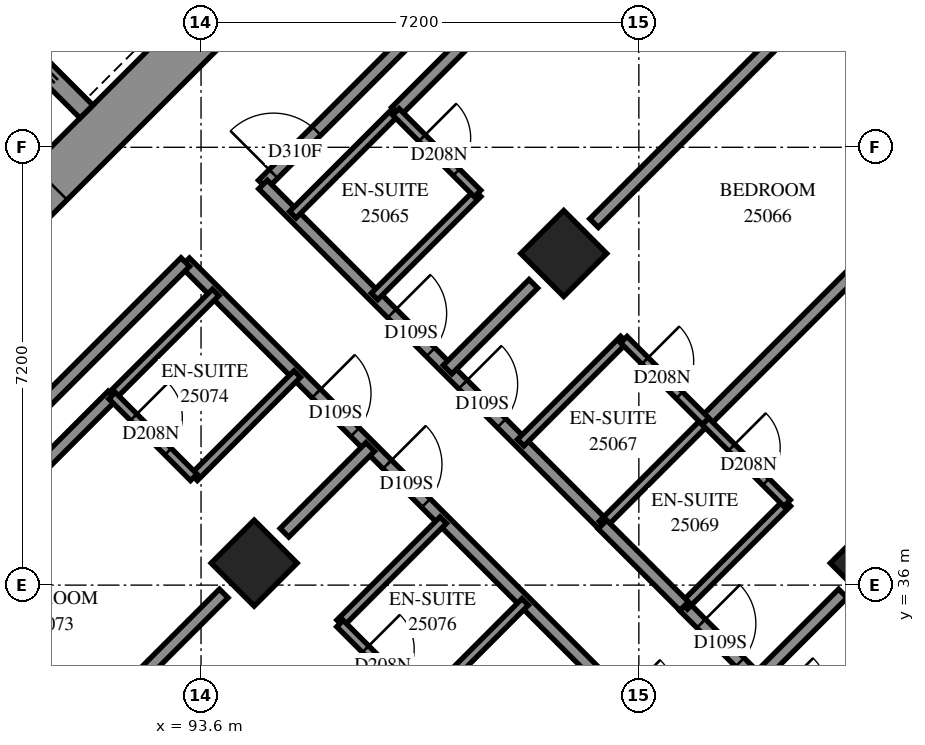
"""IFC4 building model, lengths in metres.
Left out: names, types, materials, properties, quantities, classifications, styles, units other than length and angle.
Written with IfcOpenShell. Run it as: python <this file> out.ifc"""

import sys

from ifc_helpers import new_model, si_unit, direction, frame, frame_2d, origin, origin_2d, place, context, subcontext, project, spatial, rectangle, extrude, element, fill, save


model = new_model("IFC4")
c1 = context("Model", 3, precision=1e-05, world=origin(), true_north=direction((0.0, 1.0)))
c2 = subcontext(c1, "Body", "Model", "MODEL_VIEW")
j1 = project(units=[si_unit("LENGTHUNIT", "METRE"), si_unit("PLANEANGLEUNIT", "RADIAN")], contexts=[c1])
p1 = place(None, origin())
s1 = spatial("IfcSite", under=j1, at=p1, CompositionType="ELEMENT")
p2 = place(p1, origin())
s2 = spatial("IfcBuilding", under=s1, at=p2, CompositionType="ELEMENT")
p3 = place(p2, frame((0.0, 0.0, 94.8)))
s3 = spatial("IfcBuildingStorey", under=s2, at=p3, CompositionType="ELEMENT", Elevation=94.8)
for number, where, z_axis, x_axis in (
    (1, (99.565, 41.453, 0.0), (0.0, 0.0, 1.0), (0.707, -0.707, 0.0)),
    (2, (94.474, 36.362, 0.0), (0.0, 0.0, 1.0), (0.707, -0.707, 0.0)),
    (3, (104.656, 36.362, 0.0), (0.0, 0.0, 1.0), (0.707, -0.707, 0.0)),
):
    element("IfcColumn", number, at=place(p3, frame(where, z_axis=z_axis, x_axis=x_axis)), inside=s3, PredefinedType="COLUMN", context=c2, shape_type="SweptSolid", body=[
        extrude(rectangle(XDim=1.0, YDim=1.0, at=origin_2d()), origin(), (0.0, 0.0, 1.0), 3.1),
    ])
p4 = place(p3, frame((87.12, 38.625, -0.3), z_axis=(0.0, 0.0, 1.0), x_axis=(0.7071067812, 0.7071067812, 0.0)))
e4 = element("IfcWall", 4, at=p4, inside=s3, PredefinedType="SHEAR", context=c2, shape_type="SweptSolid", body=[
    extrude(rectangle(XDim=14.4, YDim=0.8, at=frame_2d((7.2, 0.0))), origin(), (0.0, 0.0, 1.0), 2.7),
])
p5 = place(p4, frame((4.55, 0.0, 0.3)))
e5 = element("IfcOpeningElement", 5, at=p5, cuts=e4, PredefinedType="OPENING", context=c2, shape_type="SweptSolid", body=[
    extrude(rectangle(XDim=1.1, YDim=2.1, at=frame_2d((0.55, 1.05))), frame((0.0, 0.41, 0.0), z_axis=(0.0, -1.0, 0.0), x_axis=(1.0, 0.0, 0.0)), (0.0, 0.0, 1.0), 0.82),
])
p6 = place(p4, frame((11.35, 0.0, 0.3)))
e6 = element("IfcOpeningElement", 6, at=p6, cuts=e4, PredefinedType="OPENING", context=c2, shape_type="SweptSolid", body=[
    extrude(rectangle(XDim=1.1, YDim=2.1, at=frame_2d((0.55, 1.05))), frame((0.0, 0.41, 0.0), z_axis=(0.0, -1.0, 0.0), x_axis=(1.0, 0.0, 0.0)), (0.0, 0.0, 1.0), 0.82),
])
p7 = place(p3, frame((81.534, 53.969, 0.0), z_axis=(0.0, 0.0, 1.0), x_axis=(0.707103309, -0.7071102534, 0.0)))
e7 = element("IfcWall", 7, at=p7, inside=s3, PredefinedType="SOLIDWALL", context=c2, shape_type="SweptSolid", body=[
    extrude(rectangle(XDim=14.4, YDim=0.3, at=frame_2d((7.2, 0.0))), origin(), (0.0, 0.0, 1.0), 3.1),
])
p8 = place(p7, frame((12.05, 0.0, 0.0)))
e8 = element("IfcOpeningElement", 8, at=p8, cuts=e7, PredefinedType="OPENING", context=c2, shape_type="SweptSolid", body=[
    extrude(rectangle(XDim=1.1, YDim=2.1, at=frame_2d((0.55, 1.05))), frame((0.0, 0.16, 0.0), z_axis=(0.0, -1.0, 0.0), x_axis=(1.0, 0.0, 0.0)), (0.0, 0.0, 1.0), 0.32),
])
p9 = place(p3, frame((93.339, 41.309, 0.0), z_axis=(0.0, 0.0, 1.0), x_axis=(0.7071067812, -0.7071067812, 0.0)))
e9 = element("IfcWall", 9, at=p9, inside=s3, PredefinedType="PARTITIONING", context=c2, shape_type="SweptSolid", body=[
    extrude(rectangle(XDim=18.702, YDim=0.2, at=frame_2d((9.351, 0.0))), origin(), (0.0, 0.0, 1.0), 3.1),
])
p10 = place(p9, frame((3.05, 0.0, 0.0)))
e10 = element("IfcOpeningElement", 10, at=p10, cuts=e9, PredefinedType="OPENING", context=c2, shape_type="SweptSolid", body=[
    extrude(rectangle(XDim=0.9, YDim=2.1, at=frame_2d((0.45, 1.05))), frame((0.0, 0.11, 0.0), z_axis=(0.0, -1.0, 0.0), x_axis=(1.0, 0.0, 0.0)), (0.0, 0.0, 1.0), 0.22),
])
p11 = place(p9, frame((4.7, 0.0, 0.0)))
e11 = element("IfcOpeningElement", 11, at=p11, cuts=e9, PredefinedType="OPENING", context=c2, shape_type="SweptSolid", body=[
    extrude(rectangle(XDim=0.9, YDim=2.1, at=frame_2d((0.45, 1.05))), frame((0.0, 0.11, 0.0), z_axis=(0.0, -1.0, 0.0), x_axis=(1.0, 0.0, 0.0)), (0.0, 0.0, 1.0), 0.22),
])
p12 = place(p9, frame((10.149, 0.0, 0.0)))
e12 = element("IfcOpeningElement", 12, at=p12, cuts=e9, PredefinedType="OPENING", context=c2, shape_type="SweptSolid", body=[
    extrude(rectangle(XDim=0.9, YDim=2.1, at=frame_2d((0.45, 1.05))), frame((0.0, 0.11, 0.0), z_axis=(0.0, -1.0, 0.0), x_axis=(1.0, 0.0, 0.0)), (0.0, 0.0, 1.0), 0.22),
])
p13 = place(p9, frame((11.9, 0.0, 0.0)))
e13 = element("IfcOpeningElement", 13, at=p13, cuts=e9, PredefinedType="OPENING", context=c2, shape_type="SweptSolid", body=[
    extrude(rectangle(XDim=0.9, YDim=2.1, at=frame_2d((0.45, 1.05))), frame((0.0, 0.11, 0.0), z_axis=(0.0, -1.0, 0.0), x_axis=(1.0, 0.0, 0.0)), (0.0, 0.0, 1.0), 0.22),
])
p14 = place(p9, frame((17.45, 0.0, 0.0)))
e14 = element("IfcOpeningElement", 14, at=p14, cuts=e9, PredefinedType="OPENING", context=c2, shape_type="SweptSolid", body=[
    extrude(rectangle(XDim=0.9, YDim=2.1, at=frame_2d((0.45, 1.05))), frame((0.0, 0.11, 0.0), z_axis=(0.0, -1.0, 0.0), x_axis=(1.0, 0.0, 0.0)), (0.0, 0.0, 1.0), 0.22),
])
p15 = place(p3, frame((86.835, 34.806, 0.0), z_axis=(0.0, 0.0, 1.0), x_axis=(0.7071067812, 0.7071067812, 0.0)))
e15 = element("IfcWall", 15, at=p15, inside=s3, PredefinedType="PARTITIONING", context=c2, shape_type="SweptSolid", body=[
    extrude(rectangle(XDim=9.201, YDim=0.2, at=frame_2d((4.601, 0.0))), origin(), (0.0, 0.0, 1.0), 3.1),
])
p16 = place(p3, frame((94.615, 42.587, 0.0), z_axis=(0.0, 0.0, 1.0), x_axis=(0.7071067812, 0.7071067812, 0.0)))
e16 = element("IfcWall", 16, at=p16, inside=s3, PredefinedType="PARTITIONING", context=c2, shape_type="SweptSolid", body=[
    extrude(rectangle(XDim=9.198, YDim=0.2, at=frame_2d((4.599, 0.0))), origin(), (0.0, 0.0, 1.0), 3.1),
])
p17 = place(p16, frame((0.248, 0.0, 0.0)))
e17 = element("IfcOpeningElement", 17, at=p17, cuts=e16, PredefinedType="OPENING", context=c2, shape_type="SweptSolid", body=[
    extrude(rectangle(XDim=1.0, YDim=2.1, at=frame_2d((0.5, 1.05))), frame((0.0, 0.11, 0.0), z_axis=(0.0, -1.0, 0.0), x_axis=(1.0, 0.0, 0.0)), (0.0, 0.0, 1.0), 0.22),
])
p18 = place(p3, frame((101.896, 38.698, 0.0), z_axis=(0.0, 0.0, 1.0), x_axis=(0.7072241589, 0.706989384, 0.0)))
e18 = element("IfcWall", 18, at=p18, inside=s3, PredefinedType="PARTITIONING", context=c2, shape_type="SweptSolid", body=[
    extrude(rectangle(XDim=8.519, YDim=0.2, at=frame_2d((4.259, 0.0))), origin(), (0.0, 0.0, 1.0), 3.1),
])
p19 = place(p3, frame((96.805, 43.787, 0.0), z_axis=(0.0, 0.0, 1.0), x_axis=(0.7071126822, 0.7071008801, 0.0)))
e19 = element("IfcWall", 19, at=p19, inside=s3, PredefinedType="PARTITIONING", context=c2, shape_type="SweptSolid", body=[
    extrude(rectangle(XDim=8.473, YDim=0.2, at=frame_2d((4.237, 0.0))), origin(), (0.0, 0.0, 1.0), 3.1),
])
p20 = place(p3, frame((86.343, 33.316, 0.0), z_axis=(0.0, 0.0, 1.0), x_axis=(0.7069848641, 0.7072286772, 0.0)))
e20 = element("IfcWall", 20, at=p20, inside=s3, PredefinedType="PARTITIONING", context=c2, shape_type="SweptSolid", body=[
    extrude(rectangle(XDim=8.203, YDim=0.2, at=frame_2d((4.101, 0.0))), origin(), (0.0, 0.0, 1.0), 3.1),
])
p21 = place(p3, frame((94.62, 42.587, 0.0), z_axis=(0.0, 0.0, 1.0), x_axis=(0.7071067812, -0.7071067812, 0.0)))
e21 = element("IfcWall", 21, at=p21, inside=s3, PredefinedType="PARTITIONING", context=c2, shape_type="SweptSolid", body=[
    extrude(rectangle(XDim=7.9, YDim=0.2, at=frame_2d((3.95, 0.0))), origin(), (0.0, 0.0, 1.0), 3.1),
])
p22 = place(p21, frame((2.998, 0.0, 0.0)))
e22 = element("IfcOpeningElement", 22, at=p22, cuts=e21, PredefinedType="OPENING", context=c2, shape_type="SweptSolid", body=[
    extrude(rectangle(XDim=0.9, YDim=2.1, at=frame_2d((0.45, 1.05))), frame((0.0, 0.11, 0.0), z_axis=(0.0, -1.0, 0.0), x_axis=(1.0, 0.0, 0.0)), (0.0, 0.0, 1.0), 0.22),
])
p23 = place(p21, frame((4.649, 0.0, 0.0)))
e23 = element("IfcOpeningElement", 23, at=p23, cuts=e21, PredefinedType="OPENING", context=c2, shape_type="SweptSolid", body=[
    extrude(rectangle(XDim=0.9, YDim=2.1, at=frame_2d((0.45, 1.05))), frame((0.0, 0.11, 0.0), z_axis=(0.0, -1.0, 0.0), x_axis=(1.0, 0.0, 0.0)), (0.0, 0.0, 1.0), 0.22),
])
for number, where, z_axis, x_axis in (
    (24, (89.881, 31.771, 0.0), (0.0, 0.0, 1.0), (0.707, 0.707, 0.0)),
    (25, (100.063, 41.953, 0.0), (0.0, 0.0, 1.0), (0.707, 0.707, 0.0)),
):
    element("IfcWall", number, at=place(p3, frame(where, z_axis=z_axis, x_axis=x_axis)), inside=s3, PredefinedType="PARTITIONING", context=c2, shape_type="SweptSolid", body=[
        extrude(rectangle(XDim=5.787, YDim=0.2, at=frame_2d((2.893, 0.0))), origin(), (0.0, 0.0, 1.0), 3.1),
    ])
p24 = place(p3, frame((101.541, 35.651, 0.0), z_axis=(0.0, 0.0, 1.0), x_axis=(0.7071067812, -0.7071067812, 0.0)))
e26 = element("IfcWall", 26, at=p24, inside=s3, PredefinedType="PARTITIONING", context=c2, shape_type="SweptSolid", body=[
    extrude(rectangle(XDim=3.4, YDim=0.2, at=frame_2d((1.7, 0.0))), origin(), (0.0, 0.0, 1.0), 3.1),
])
p25 = place(p24, frame((0.4, 0.0, 0.0)))
e27 = element("IfcOpeningElement", 27, at=p25, cuts=e26, PredefinedType="OPENING", context=c2, shape_type="SweptSolid", body=[
    extrude(rectangle(XDim=0.9, YDim=2.1, at=frame_2d((0.45, 1.05))), frame((0.0, 0.11, 0.0), z_axis=(0.0, -1.0, 0.0), x_axis=(1.0, 0.0, 0.0)), (0.0, 0.0, 1.0), 0.22),
])
p26 = place(p24, frame((2.105, 0.0, 0.0)))
e28 = element("IfcOpeningElement", 28, at=p26, cuts=e26, PredefinedType="OPENING", context=c2, shape_type="SweptSolid", body=[
    extrude(rectangle(XDim=0.9, YDim=2.1, at=frame_2d((0.45, 1.05))), frame((0.0, 0.11, 0.0), z_axis=(0.0, -1.0, 0.0), x_axis=(1.0, 0.0, 0.0)), (0.0, 0.0, 1.0), 0.22),
])
for number, where, z_axis, x_axis in (
    (29, (92.143, 39.117, 0.0), (0.0, 0.0, 1.0), (0.708, 0.707, 0.0)),
    (30, (93.487, 37.773, 0.0), (0.0, 0.0, 1.0), (0.707, 0.708, 0.0)),
    (31, (97.234, 34.026, 0.0), (0.0, 0.0, 1.0), (0.707, 0.708, 0.0)),
    (32, (100.203, 36.997, 0.0), (0.0, 0.0, 1.0), (0.707, 0.708, 0.0)),
):
    element("IfcWall", number, at=place(p3, frame(where, z_axis=z_axis, x_axis=x_axis)), inside=s3, PredefinedType="PARTITIONING", context=c2, shape_type="SweptSolid", body=[
        extrude(rectangle(XDim=2.4, YDim=0.15, at=frame_2d((1.2, 0.0))), origin(), (0.0, 0.0, 1.0), 3.1),
    ])
for number, where, z_axis, x_axis in (
    (33, (96.453, 40.747, 0.0), (0.0, 0.0, 1.0), (0.707, 0.707, 0.0)),
    (34, (95.109, 42.091, 0.0), (0.0, 0.0, 1.0), (0.707, 0.707, 0.0)),
    (35, (95.887, 35.373, 0.0), (0.0, 0.0, 1.0), (0.707, 0.707, 0.0)),
    (36, (98.857, 38.343, 0.0), (0.0, 0.0, 1.0), (0.707, 0.707, 0.0)),
    (37, (101.545, 35.657, 0.0), (0.0, 0.0, 1.0), (0.707, 0.707, 0.0)),
    (38, (103.949, 33.253, 0.0), (0.0, 0.0, 1.0), (0.707, 0.707, 0.0)),
):
    element("IfcWall", number, at=place(p3, frame(where, z_axis=z_axis, x_axis=x_axis)), inside=s3, PredefinedType="PARTITIONING", context=c2, shape_type="SweptSolid", body=[
        extrude(rectangle(XDim=2.398, YDim=0.15, at=frame_2d((1.199, 0.0))), origin(), (0.0, 0.0, 1.0), 3.1),
    ])
for number, where, z_axis, x_axis in (
    (39, (97.655, 39.545, 0.0), (0.0, 0.0, 1.0), (0.707, 0.707, 0.0)),
    (40, (94.972, 36.862, 0.0), (0.0, 0.0, 1.0), (0.707, 0.707, 0.0)),
):
    element("IfcWall", number, at=place(p3, frame(where, z_axis=z_axis, x_axis=x_axis)), inside=s3, PredefinedType="PARTITIONING", context=c2, shape_type="SweptSolid", body=[
        extrude(rectangle(XDim=1.994, YDim=0.2, at=frame_2d((0.997, 0.0))), origin(), (0.0, 0.0, 1.0), 3.1),
    ])
p27 = place(p3, frame((102.747, 34.455, 0.0), z_axis=(0.0, 0.0, 1.0), x_axis=(0.7071067812, 0.7071067812, 0.0)))
e41 = element("IfcWall", 41, at=p27, inside=s3, PredefinedType="PARTITIONING", context=c2, shape_type="SweptSolid", body=[
    extrude(rectangle(XDim=1.991, YDim=0.2, at=frame_2d((0.996, 0.0))), origin(), (0.0, 0.0, 1.0), 3.1),
])
p28 = place(p3, frame((96.803, 43.783, 0.0), z_axis=(0.0, 0.0, 1.0), x_axis=(0.7071067812, -0.7071067812, 0.0)))
e42 = element("IfcWall", 42, at=p28, inside=s3, PredefinedType="PARTITIONING", context=c2, shape_type="SweptSolid", body=[
    extrude(rectangle(XDim=1.901, YDim=0.15, at=frame_2d((0.95, 0.0))), origin(), (0.0, 0.0, 1.0), 3.1),
])
p29 = place(p28, frame((0.609, 0.0, 0.0)))
e43 = element("IfcOpeningElement", 43, at=p29, cuts=e42, PredefinedType="OPENING", context=c2, shape_type="SweptSolid", body=[
    extrude(rectangle(XDim=0.8, YDim=2.1, at=frame_2d((0.4, 1.05))), frame((0.0, 0.085, 0.0), z_axis=(0.0, -1.0, 0.0), x_axis=(1.0, 0.0, 0.0)), (0.0, 0.0, 1.0), 0.17),
])
p30 = place(p3, frame((101.894, 38.693, 0.0), z_axis=(0.0, 0.0, 1.0), x_axis=(0.7071067812, -0.7071067812, 0.0)))
e44 = element("IfcWall", 44, at=p30, inside=s3, PredefinedType="PARTITIONING", context=c2, shape_type="SweptSolid", body=[
    extrude(rectangle(XDim=1.901, YDim=0.15, at=frame_2d((0.95, 0.0))), origin(), (0.0, 0.0, 1.0), 3.1),
])
p31 = place(p30, frame((0.608, 0.0, 0.0)))
e45 = element("IfcOpeningElement", 45, at=p31, cuts=e44, PredefinedType="OPENING", context=c2, shape_type="SweptSolid", body=[
    extrude(rectangle(XDim=0.8, YDim=2.1, at=frame_2d((0.4, 1.05))), frame((0.0, 0.085, 0.0), z_axis=(0.0, -1.0, 0.0), x_axis=(1.0, 0.0, 0.0)), (0.0, 0.0, 1.0), 0.17),
])
p32 = place(p3, frame((95.885, 35.369, 0.0), z_axis=(0.0, 0.0, 1.0), x_axis=(0.7071067812, -0.7071067812, 0.0)))
e46 = element("IfcWall", 46, at=p32, inside=s3, PredefinedType="PARTITIONING", context=c2, shape_type="SweptSolid", body=[
    extrude(rectangle(XDim=1.901, YDim=0.15, at=frame_2d((0.95, 0.0))), origin(), (0.0, 0.0, 1.0), 3.1),
])
p33 = place(p32, frame((0.595, 0.0, 0.0)))
e47 = element("IfcOpeningElement", 47, at=p33, cuts=e46, PredefinedType="OPENING", context=c2, shape_type="SweptSolid", body=[
    extrude(rectangle(XDim=0.8, YDim=2.1, at=frame_2d((0.4, 1.05))), frame((0.0, 0.085, 0.0), z_axis=(0.0, -1.0, 0.0), x_axis=(1.0, 0.0, 0.0)), (0.0, 0.0, 1.0), 0.17),
])
p34 = place(p3, frame((92.137, 39.117, 0.0), z_axis=(0.0, 0.0, 1.0), x_axis=(0.7071067812, -0.7071067812, 0.0)))
e48 = element("IfcWall", 48, at=p34, inside=s3, PredefinedType="PARTITIONING", context=c2, shape_type="SweptSolid", body=[
    extrude(rectangle(XDim=1.901, YDim=0.15, at=frame_2d((0.95, 0.0))), origin(), (0.0, 0.0, 1.0), 3.1),
])
p35 = place(p34, frame((0.502, 0.0, 0.0)))
e49 = element("IfcOpeningElement", 49, at=p35, cuts=e48, PredefinedType="OPENING", context=c2, shape_type="SweptSolid", body=[
    extrude(rectangle(XDim=0.8, YDim=2.1, at=frame_2d((0.4, 1.05))), frame((0.0, 0.085, 0.0), z_axis=(0.0, -1.0, 0.0), x_axis=(1.0, 0.0, 0.0)), (0.0, 0.0, 1.0), 0.17),
])
p36 = place(p3, frame((100.553, 40.037, 0.0), z_axis=(0.0, 0.0, 1.0), x_axis=(0.7076330979, -0.7065800724, 0.0)))
e50 = element("IfcWall", 50, at=p36, inside=s3, PredefinedType="PARTITIONING", context=c2, shape_type="SweptSolid", body=[
    extrude(rectangle(XDim=1.899, YDim=0.15, at=frame_2d((0.95, 0.0))), origin(), (0.0, 0.0, 1.0), 3.1),
])
p37 = place(p36, frame((0.493, 0.0, 0.0)))
e51 = element("IfcOpeningElement", 51, at=p37, cuts=e50, PredefinedType="OPENING", context=c2, shape_type="SweptSolid", body=[
    extrude(rectangle(XDim=0.8, YDim=2.1, at=frame_2d((0.4, 1.05))), frame((0.0, 0.085, 0.0), z_axis=(0.0, -1.0, 0.0), x_axis=(1.0, 0.0, 0.0)), (0.0, 0.0, 1.0), 0.17),
])
p38 = place(p3, frame((100.201, 36.997, 0.0), z_axis=(0.0, 0.0, 1.0), x_axis=(0.7076330979, -0.7065800724, 0.0)))
e52 = element("IfcWall", 52, at=p38, inside=s3, PredefinedType="PARTITIONING", context=c2, shape_type="SweptSolid", body=[
    extrude(rectangle(XDim=1.899, YDim=0.2, at=frame_2d((0.95, 0.0))), origin(), (0.0, 0.0, 1.0), 3.1),
])
p39 = place(p17, origin())
e53 = element("IfcDoor", 53, at=p39, inside=s3, OperationType="SINGLE_SWING_RIGHT", PredefinedType="DOOR", context=c2, shape_type="SweptSolid", body=[
    extrude(rectangle(XDim=1.0, YDim=2.1, at=frame_2d((0.5, 1.05))), frame((0.0, 0.025, 0.0), z_axis=(0.0, -1.0, 0.0), x_axis=(1.0, 0.0, 0.0)), (0.0, 0.0, 1.0), 0.05),
])
fill(e17, e53)
p40 = place(p22, origin())
e54 = element("IfcDoor", 54, at=p40, inside=s3, OperationType="SINGLE_SWING_RIGHT", PredefinedType="DOOR", context=c2, shape_type="SweptSolid", body=[
    extrude(rectangle(XDim=0.9, YDim=2.1, at=frame_2d((0.45, 1.05))), frame((0.0, 0.025, 0.0), z_axis=(0.0, -1.0, 0.0), x_axis=(1.0, 0.0, 0.0)), (0.0, 0.0, 1.0), 0.05),
])
fill(e22, e54)
p41 = place(p29, origin())
e55 = element("IfcDoor", 55, at=p41, inside=s3, OperationType="SINGLE_SWING_RIGHT", PredefinedType="DOOR", context=c2, shape_type="SweptSolid", body=[
    extrude(rectangle(XDim=0.8, YDim=2.1, at=frame_2d((0.4, 1.05))), frame((0.0, 0.025, 0.0), z_axis=(0.0, -1.0, 0.0), x_axis=(1.0, 0.0, 0.0)), (0.0, 0.0, 1.0), 0.05),
])
fill(e43, e55)
p42 = place(p23, origin())
e56 = element("IfcDoor", 56, at=p42, inside=s3, OperationType="SINGLE_SWING_LEFT", PredefinedType="DOOR", context=c2, shape_type="SweptSolid", body=[
    extrude(rectangle(XDim=0.9, YDim=2.1, at=frame_2d((0.45, 1.05))), frame((0.0, 0.025, 0.0), z_axis=(0.0, -1.0, 0.0), x_axis=(1.0, 0.0, 0.0)), (0.0, 0.0, 1.0), 0.05),
])
fill(e23, e56)
p43 = place(p37, origin())
e57 = element("IfcDoor", 57, at=p43, inside=s3, OperationType="SINGLE_SWING_RIGHT", PredefinedType="DOOR", context=c2, shape_type="SweptSolid", body=[
    extrude(rectangle(XDim=0.8, YDim=2.1, at=frame_2d((0.4, 1.05))), frame((0.0, 0.025, 0.0), z_axis=(0.0, -1.0, 0.0), x_axis=(1.0, 0.0, 0.0)), (0.0, 0.0, 1.0), 0.05),
])
fill(e51, e57)
p44 = place(p25, origin())
e58 = element("IfcDoor", 58, at=p44, inside=s3, OperationType="SINGLE_SWING_RIGHT", PredefinedType="DOOR", context=c2, shape_type="SweptSolid", body=[
    extrude(rectangle(XDim=0.9, YDim=2.1, at=frame_2d((0.45, 1.05))), frame((0.0, 0.025, 0.0), z_axis=(0.0, -1.0, 0.0), x_axis=(1.0, 0.0, 0.0)), (0.0, 0.0, 1.0), 0.05),
])
fill(e27, e58)
p45 = place(p31, origin())
e59 = element("IfcDoor", 59, at=p45, inside=s3, OperationType="SINGLE_SWING_RIGHT", PredefinedType="DOOR", context=c2, shape_type="SweptSolid", body=[
    extrude(rectangle(XDim=0.8, YDim=2.1, at=frame_2d((0.4, 1.05))), frame((0.0, 0.025, 0.0), z_axis=(0.0, -1.0, 0.0), x_axis=(1.0, 0.0, 0.0)), (0.0, 0.0, 1.0), 0.05),
])
fill(e45, e59)
p46 = place(p10, origin())
e60 = element("IfcDoor", 60, at=p46, inside=s3, OperationType="SINGLE_SWING_LEFT", PredefinedType="DOOR", context=c2, shape_type="SweptSolid", body=[
    extrude(rectangle(XDim=0.9, YDim=2.1, at=frame_2d((0.45, 1.05))), frame((0.0, 0.025, 0.0), z_axis=(0.0, -1.0, 0.0), x_axis=(1.0, 0.0, 0.0)), (0.0, 0.0, 1.0), 0.05),
])
fill(e10, e60)
p47 = place(p35, origin())
e61 = element("IfcDoor", 61, at=p47, inside=s3, OperationType="SINGLE_SWING_RIGHT", PredefinedType="DOOR", context=c2, shape_type="SweptSolid", body=[
    extrude(rectangle(XDim=0.8, YDim=2.1, at=frame_2d((0.4, 1.05))), frame((0.0, 0.025, 0.0), z_axis=(0.0, -1.0, 0.0), x_axis=(1.0, 0.0, 0.0)), (0.0, 0.0, 1.0), 0.05),
])
fill(e49, e61)
p48 = place(p11, origin())
e62 = element("IfcDoor", 62, at=p48, inside=s3, OperationType="SINGLE_SWING_RIGHT", PredefinedType="DOOR", context=c2, shape_type="SweptSolid", body=[
    extrude(rectangle(XDim=0.9, YDim=2.1, at=frame_2d((0.45, 1.05))), frame((0.0, 0.025, 0.0), z_axis=(0.0, -1.0, 0.0), x_axis=(1.0, 0.0, 0.0)), (0.0, 0.0, 1.0), 0.05),
])
fill(e11, e62)
p49 = place(p33, origin())
e63 = element("IfcDoor", 63, at=p49, inside=s3, OperationType="SINGLE_SWING_RIGHT", PredefinedType="DOOR", context=c2, shape_type="SweptSolid", body=[
    extrude(rectangle(XDim=0.8, YDim=2.1, at=frame_2d((0.4, 1.05))), frame((0.0, 0.025, 0.0), z_axis=(0.0, -1.0, 0.0), x_axis=(1.0, 0.0, 0.0)), (0.0, 0.0, 1.0), 0.05),
])
fill(e47, e63)
save(model, sys.argv[1])
